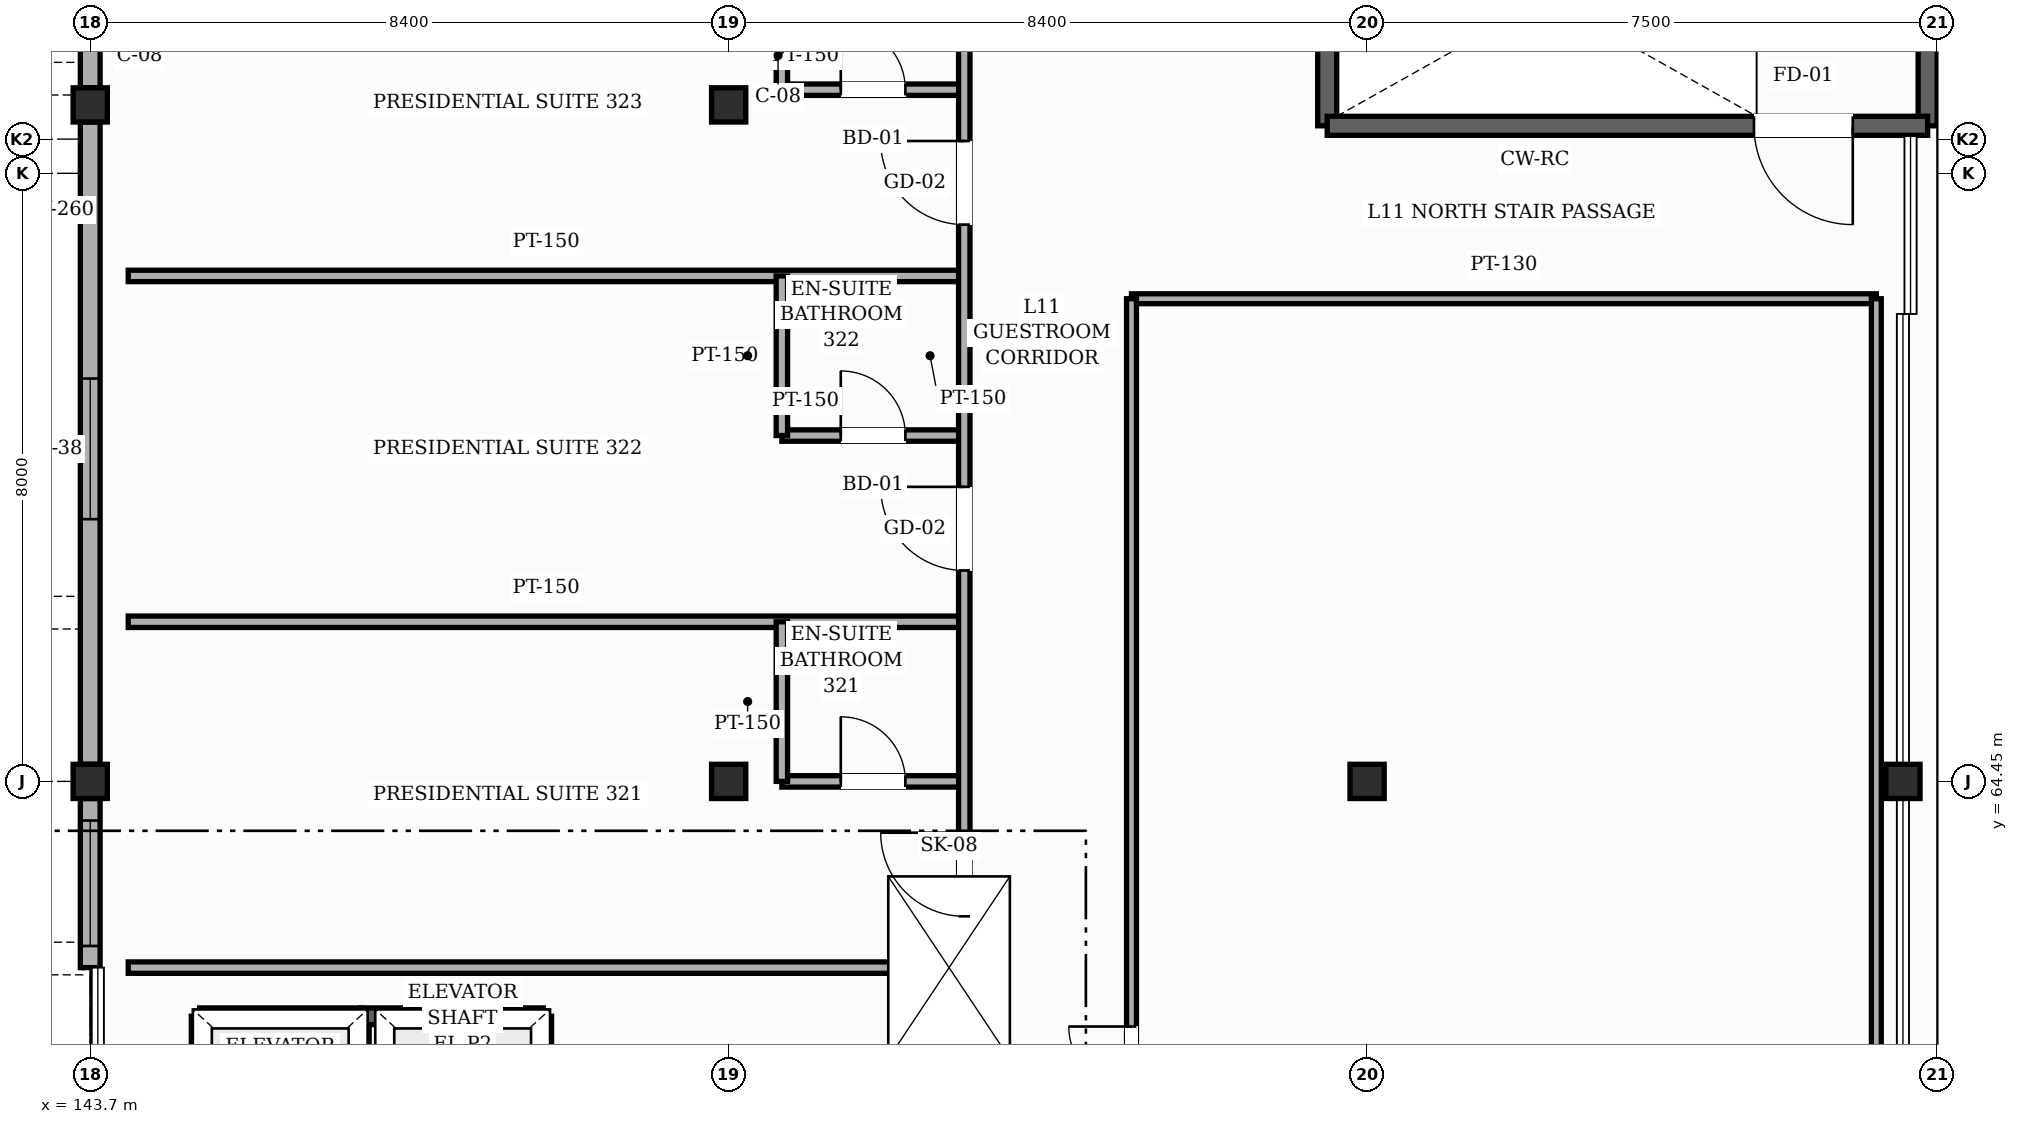
"""IFC4 building model, lengths in metres.
Left out: names, types, materials, properties, quantities, classifications, styles, units other than length and angle.
Written with IfcOpenShell. Run it as: python <this file> out.ifc"""

import sys

from ifc_helpers import new_model, si_unit, direction, frame, frame_2d, origin, origin_2d, place, context, subcontext, project, spatial, rectangle, hollow_rectangle, extrude, element, fill, save


model = new_model("IFC4")
c1 = context("Model", 3, precision=1e-05, world=origin(), true_north=direction((0.0, 1.0)))
c2 = subcontext(c1, "Body", "Model", "MODEL_VIEW")
j1 = project(units=[si_unit("LENGTHUNIT", "METRE"), si_unit("PLANEANGLEUNIT", "RADIAN")], contexts=[c1])
p1 = place(None, origin())
s1 = spatial("IfcSite", under=j1, at=p1, CompositionType="ELEMENT")
p2 = place(p1, origin())
s2 = spatial("IfcBuilding", under=s1, at=p2, CompositionType="ELEMENT")
p3 = place(p2, frame((0.0, 0.0, 46.2)))
s3 = spatial("IfcBuildingStorey", under=s2, at=p3, CompositionType="ELEMENT", Elevation=46.2)
for number, where, z_axis, x_axis in (
    (1, (143.7, 64.45, 0.0), (0.0, 0.0, 1.0), (1.0, 0.0, 0.0)),
    (2, (143.7, 73.35, 0.0), (0.0, 0.0, 1.0), (1.0, 0.0, 0.0)),
    (3, (152.1, 64.45, 0.0), (0.0, 0.0, 1.0), (1.0, 0.0, 0.0)),
    (4, (152.1, 73.35, 0.0), (0.0, 0.0, 1.0), (1.0, 0.0, 0.0)),
    (5, (160.5, 64.45, 0.0), (0.0, 0.0, 1.0), (1.0, 0.0, 0.0)),
    (6, (167.55, 64.45, 0.0), (0.0, 0.0, 1.0), (1.0, 0.0, 0.0)),
):
    element("IfcColumn", number, at=place(p3, frame(where, z_axis=z_axis, x_axis=x_axis)), inside=s3, PredefinedType="COLUMN", context=c2, shape_type="SweptSolid", body=[
        extrude(hollow_rectangle(XDim=0.45, YDim=0.45, WallThickness=0.019, InnerFilletRadius=0.019, OuterFilletRadius=0.038, at=origin_2d()), origin(), (0.0, 0.0, 1.0), 3.99),
    ])
p4 = place(p3, frame((143.7, 62.0, 0.0), z_axis=(0.0, 0.0, 1.0), x_axis=(0.0, 1.0, 0.0)))
e7 = element("IfcWall", 7, at=p4, inside=s3, PredefinedType="SOLIDWALL", context=c2, shape_type="SweptSolid", body=[
    extrude(rectangle(XDim=2.225, YDim=0.26, at=frame_2d((1.113, 0.0))), origin(), (0.0, 0.0, 1.0), 3.375),
])
p5 = place(p4, frame((0.285, 0.0, 0.85)))
e8 = element("IfcOpeningElement", 8, at=p5, cuts=e7, PredefinedType="OPENING", context=c2, shape_type="SweptSolid", body=[
    extrude(rectangle(XDim=1.65, YDim=1.65, at=frame_2d((0.825, 0.825))), frame((0.0, 0.14, 0.0), z_axis=(0.0, -1.0, 0.0), x_axis=(1.0, 0.0, 0.0)), (0.0, 0.0, 1.0), 0.28),
])
p6 = place(p3, frame((143.7, 64.675, 0.0), z_axis=(0.0, 0.0, 1.0), x_axis=(0.0, 1.0, 0.0)))
e9 = element("IfcWall", 9, at=p6, inside=s3, PredefinedType="SOLIDWALL", context=c2, shape_type="SweptSolid", body=[
    extrude(rectangle(XDim=8.45, YDim=0.26, at=frame_2d((4.225, 0.0))), origin(), (0.0, 0.0, 1.0), 3.225),
])
p7 = place(p6, frame((3.225, 0.0, 0.85)))
e10 = element("IfcOpeningElement", 10, at=p7, cuts=e9, PredefinedType="OPENING", context=c2, shape_type="SweptSolid", body=[
    extrude(rectangle(XDim=1.85, YDim=1.65, at=frame_2d((0.925, 0.825))), frame((0.0, 0.14, 0.0), z_axis=(0.0, -1.0, 0.0), x_axis=(1.0, 0.0, 0.0)), (0.0, 0.0, 1.0), 0.28),
])
p8 = place(p3, frame((143.7, 73.575, 0.0), z_axis=(0.0, 0.0, 1.0), x_axis=(0.0, 1.0, 0.0)))
e11 = element("IfcWall", 11, at=p8, inside=s3, PredefinedType="SOLIDWALL", context=c2, shape_type="SweptSolid", body=[
    extrude(rectangle(XDim=6.625, YDim=0.26, at=frame_2d((3.312, 0.0))), origin(), (0.0, 0.0, 1.0), 3.375),
])
p9 = place(p8, frame((0.615, 0.0, 0.85)))
e12 = element("IfcOpeningElement", 12, at=p9, cuts=e11, PredefinedType="OPENING", context=c2, shape_type="SweptSolid", body=[
    extrude(rectangle(XDim=0.85, YDim=1.35, at=frame_2d((0.425, 0.675))), frame((0.0, 0.14, 0.0), z_axis=(0.0, -1.0, 0.0), x_axis=(1.0, 0.0, 0.0)), (0.0, 0.0, 1.0), 0.28),
])
p10 = place(p8, frame((3.775, 0.0, 0.85)))
e13 = element("IfcOpeningElement", 13, at=p10, cuts=e11, PredefinedType="OPENING", context=c2, shape_type="SweptSolid", body=[
    extrude(rectangle(XDim=1.15, YDim=1.8, at=frame_2d((0.575, 0.9))), frame((0.0, 0.14, 0.0), z_axis=(0.0, -1.0, 0.0), x_axis=(1.0, 0.0, 0.0)), (0.0, 0.0, 1.0), 0.28),
])
for number, where, z_axis, x_axis in (
    (14, (167.875, 76.425, 0.0), (0.0, 0.0, 1.0), (0.0, -1.0, 0.0)),
    (15, (159.975, 73.075, 0.0), (0.0, 0.0, 1.0), (0.0, 1.0, 0.0)),
):
    element("IfcWall", number, at=place(p3, frame(where, z_axis=z_axis, x_axis=x_axis)), inside=s3, PredefinedType="SHEAR", context=c2, shape_type="SweptSolid", body=[
        extrude(rectangle(XDim=3.35, YDim=0.25, at=frame_2d((1.675, 0.0))), origin(), (0.0, 0.0, 1.0), 3.95),
    ])
p11 = place(p3, frame((167.875, 73.075, 0.0), z_axis=(0.0, 0.0, 1.0), x_axis=(-1.0, 0.0, 0.0)))
e16 = element("IfcWall", 16, at=p11, inside=s3, PredefinedType="SHEAR", context=c2, shape_type="SweptSolid", body=[
    extrude(rectangle(XDim=7.9, YDim=0.25, at=frame_2d((3.95, 0.0))), origin(), (0.0, 0.0, 1.0), 3.95),
])
p12 = place(p11, frame((0.985, 0.0, 0.0)))
e17 = element("IfcOpeningElement", 17, at=p12, cuts=e16, PredefinedType="OPENING", context=c2, shape_type="SweptSolid", body=[
    extrude(rectangle(XDim=1.3, YDim=2.2, at=frame_2d((0.65, 1.1))), frame((0.0, 0.135, 0.0), z_axis=(0.0, -1.0, 0.0), x_axis=(1.0, 0.0, 0.0)), (0.0, 0.0, 1.0), 0.27),
])
p13 = place(p3, frame((145.14, 61.36, 0.0), z_axis=(0.0, 0.0, 1.0), x_axis=(1.0, 0.0, 0.0)))
e18 = element("IfcWall", 18, at=p13, inside=s3, PredefinedType="SHEAR", context=c2, shape_type="SweptSolid", body=[
    extrude(rectangle(XDim=2.12, YDim=0.22, at=frame_2d((1.06, 0.0))), origin(), (0.0, 0.0, 1.0), 3.95),
])
for number, where, z_axis, x_axis in (
    (19, (147.26, 59.44, 0.0), (0.0, 0.0, 1.0), (0.0, 1.0, 0.0)),
    (20, (145.14, 59.44, 0.0), (0.0, 0.0, 1.0), (0.0, 1.0, 0.0)),
):
    element("IfcWall", number, at=place(p3, frame(where, z_axis=z_axis, x_axis=x_axis)), inside=s3, PredefinedType="SHEAR", context=c2, shape_type="SweptSolid", body=[
        extrude(rectangle(XDim=1.92, YDim=0.22, at=frame_2d((0.96, 0.0))), origin(), (0.0, 0.0, 1.0), 3.95),
    ])
p14 = place(p3, frame((147.26, 61.36, 0.0), z_axis=(0.0, 0.0, 1.0), x_axis=(1.0, 0.0, 0.0)))
e21 = element("IfcWall", 21, at=p14, inside=s3, PredefinedType="SHEAR", context=c2, shape_type="SweptSolid", body=[
    extrude(rectangle(XDim=2.4, YDim=0.22, at=frame_2d((1.2, 0.0))), origin(), (0.0, 0.0, 1.0), 3.95),
])
p15 = place(p3, frame((149.66, 59.44, 0.0), z_axis=(0.0, 0.0, 1.0), x_axis=(0.0, 1.0, 0.0)))
e22 = element("IfcWall", 22, at=p15, inside=s3, PredefinedType="SHEAR", context=c2, shape_type="SweptSolid", body=[
    extrude(rectangle(XDim=1.92, YDim=0.22, at=frame_2d((0.96, 0.0))), origin(), (0.0, 0.0, 1.0), 3.95),
])
p16 = place(p3, frame((144.2, 62.0, 0.0), z_axis=(0.0, 0.0, 1.0), x_axis=(1.0, 0.0, 0.0)))
e23 = element("IfcWall", 23, at=p16, inside=s3, PredefinedType="PARTITIONING", context=c2, shape_type="SweptSolid", body=[
    extrude(rectangle(XDim=11.0, YDim=0.15, at=frame_2d((5.5, 0.0))), origin(), (0.0, 0.0, 1.0), 3.935),
])
p17 = place(p3, frame((152.8, 64.45, 0.0), z_axis=(0.0, 0.0, 1.0), x_axis=(1.0, 0.0, 0.0)))
e24 = element("IfcWall", 24, at=p17, inside=s3, PredefinedType="PARTITIONING", context=c2, shape_type="SweptSolid", body=[
    extrude(rectangle(XDim=2.4, YDim=0.15, at=frame_2d((1.2, 0.0))), origin(), (0.0, 0.0, 1.0), 3.325),
])
p18 = place(p17, frame((0.775, 0.0, 0.0)))
e25 = element("IfcOpeningElement", 25, at=p18, cuts=e24, PredefinedType="OPENING", context=c2, shape_type="SweptSolid", body=[
    extrude(rectangle(XDim=0.85, YDim=2.1, at=frame_2d((0.425, 1.05))), frame((0.0, 0.085, 0.0), z_axis=(0.0, -1.0, 0.0), x_axis=(1.0, 0.0, 0.0)), (0.0, 0.0, 1.0), 0.17),
])
p19 = place(p3, frame((144.2, 66.55, 0.0), z_axis=(0.0, 0.0, 1.0), x_axis=(1.0, 0.0, 0.0)))
e26 = element("IfcWall", 26, at=p19, inside=s3, PredefinedType="PARTITIONING", context=c2, shape_type="SweptSolid", body=[
    extrude(rectangle(XDim=11.0, YDim=0.15, at=frame_2d((5.5, 0.0))), origin(), (0.0, 0.0, 1.0), 3.935),
])
p20 = place(p3, frame((152.8, 69.0, 0.0), z_axis=(0.0, 0.0, 1.0), x_axis=(1.0, 0.0, 0.0)))
e27 = element("IfcWall", 27, at=p20, inside=s3, PredefinedType="PARTITIONING", context=c2, shape_type="SweptSolid", body=[
    extrude(rectangle(XDim=2.4, YDim=0.15, at=frame_2d((1.2, 0.0))), origin(), (0.0, 0.0, 1.0), 3.935),
])
p21 = place(p20, frame((0.775, 0.0, 0.0)))
e28 = element("IfcOpeningElement", 28, at=p21, cuts=e27, PredefinedType="OPENING", context=c2, shape_type="SweptSolid", body=[
    extrude(rectangle(XDim=0.85, YDim=2.1, at=frame_2d((0.425, 1.05))), frame((0.0, 0.085, 0.0), z_axis=(0.0, -1.0, 0.0), x_axis=(1.0, 0.0, 0.0)), (0.0, 0.0, 1.0), 0.17),
])
p22 = place(p3, frame((157.4, 70.8, 0.0), z_axis=(0.0, 0.0, 1.0), x_axis=(1.0, 0.0, 0.0)))
e29 = element("IfcWall", 29, at=p22, inside=s3, PredefinedType="PARTITIONING", context=c2, shape_type="SweptSolid", body=[
    extrude(rectangle(XDim=9.8, YDim=0.13, at=frame_2d((4.9, 0.0))), origin(), (0.0, 0.0, 1.0), 3.935),
])
p23 = place(p3, frame((144.2, 71.1, 0.0), z_axis=(0.0, 0.0, 1.0), x_axis=(1.0, 0.0, 0.0)))
e30 = element("IfcWall", 30, at=p23, inside=s3, PredefinedType="PARTITIONING", context=c2, shape_type="SweptSolid", body=[
    extrude(rectangle(XDim=11.0, YDim=0.15, at=frame_2d((5.5, 0.0))), origin(), (0.0, 0.0, 1.0), 3.935),
])
p24 = place(p3, frame((152.8, 73.55, 0.0), z_axis=(0.0, 0.0, 1.0), x_axis=(1.0, 0.0, 0.0)))
e31 = element("IfcWall", 31, at=p24, inside=s3, PredefinedType="PARTITIONING", context=c2, shape_type="SweptSolid", body=[
    extrude(rectangle(XDim=2.4, YDim=0.15, at=frame_2d((1.2, 0.0))), origin(), (0.0, 0.0, 1.0), 3.935),
])
p25 = place(p24, frame((0.775, 0.0, 0.0)))
e32 = element("IfcOpeningElement", 32, at=p25, cuts=e31, PredefinedType="OPENING", context=c2, shape_type="SweptSolid", body=[
    extrude(rectangle(XDim=0.85, YDim=2.1, at=frame_2d((0.425, 1.05))), frame((0.0, 0.085, 0.0), z_axis=(0.0, -1.0, 0.0), x_axis=(1.0, 0.0, 0.0)), (0.0, 0.0, 1.0), 0.17),
])
for number, where, z_axis, x_axis in (
    (33, (152.8, 64.45, 0.0), (0.0, 0.0, 1.0), (0.0, 1.0, 0.0)),
    (34, (152.8, 69.0, 0.0), (0.0, 0.0, 1.0), (0.0, 1.0, 0.0)),
):
    element("IfcWall", number, at=place(p3, frame(where, z_axis=z_axis, x_axis=x_axis)), inside=s3, PredefinedType="PARTITIONING", context=c2, shape_type="SweptSolid", body=[
        extrude(rectangle(XDim=2.1, YDim=0.15, at=frame_2d((1.05, 0.0))), origin(), (0.0, 0.0, 1.0), 3.935),
    ])
p26 = place(p3, frame((152.8, 73.55, 0.0), z_axis=(0.0, 0.0, 1.0), x_axis=(0.0, 1.0, 0.0)))
e35 = element("IfcWall", 35, at=p26, inside=s3, PredefinedType="PARTITIONING", context=c2, shape_type="SweptSolid", body=[
    extrude(rectangle(XDim=2.1, YDim=0.15, at=frame_2d((1.05, 0.0))), origin(), (0.0, 0.0, 1.0), 3.935),
])
p27 = place(p3, frame((155.2, 62.0, 0.0), z_axis=(0.0, 0.0, 1.0), x_axis=(0.0, 1.0, 0.0)))
e36 = element("IfcWall", 36, at=p27, inside=s3, PredefinedType="PARTITIONING", context=c2, shape_type="SweptSolid", body=[
    extrude(rectangle(XDim=18.2, YDim=0.15, at=frame_2d((9.1, 0.0))), origin(), (0.0, 0.0, 1.0), 3.935),
])
p28 = place(p27, frame((0.675, 0.0, 0.0)))
e37 = element("IfcOpeningElement", 37, at=p28, cuts=e36, PredefinedType="OPENING", context=c2, shape_type="SweptSolid", body=[
    extrude(rectangle(XDim=1.1, YDim=2.2, at=frame_2d((0.55, 1.1))), frame((0.0, 0.085, 0.0), z_axis=(0.0, -1.0, 0.0), x_axis=(1.0, 0.0, 0.0)), (0.0, 0.0, 1.0), 0.17),
])
p29 = place(p27, frame((5.225, 0.0, 0.0)))
e38 = element("IfcOpeningElement", 38, at=p29, cuts=e36, PredefinedType="OPENING", context=c2, shape_type="SweptSolid", body=[
    extrude(rectangle(XDim=1.1, YDim=2.2, at=frame_2d((0.55, 1.1))), frame((0.0, 0.085, 0.0), z_axis=(0.0, -1.0, 0.0), x_axis=(1.0, 0.0, 0.0)), (0.0, 0.0, 1.0), 0.17),
])
p30 = place(p27, frame((9.775, 0.0, 0.0)))
e39 = element("IfcOpeningElement", 39, at=p30, cuts=e36, PredefinedType="OPENING", context=c2, shape_type="SweptSolid", body=[
    extrude(rectangle(XDim=1.1, YDim=2.2, at=frame_2d((0.55, 1.1))), frame((0.0, 0.085, 0.0), z_axis=(0.0, -1.0, 0.0), x_axis=(1.0, 0.0, 0.0)), (0.0, 0.0, 1.0), 0.17),
])
p31 = place(p27, frame((14.325, 0.0, 0.0)))
e40 = element("IfcOpeningElement", 40, at=p31, cuts=e36, PredefinedType="OPENING", context=c2, shape_type="SweptSolid", body=[
    extrude(rectangle(XDim=1.1, YDim=2.2, at=frame_2d((0.55, 1.1))), frame((0.0, 0.085, 0.0), z_axis=(0.0, -1.0, 0.0), x_axis=(1.0, 0.0, 0.0)), (0.0, 0.0, 1.0), 0.17),
])
p32 = place(p3, frame((157.4, 22.6, 0.0), z_axis=(0.0, 0.0, 1.0), x_axis=(0.0, 1.0, 0.0)))
e41 = element("IfcWall", 41, at=p32, inside=s3, PredefinedType="PARTITIONING", context=c2, shape_type="SweptSolid", body=[
    extrude(rectangle(XDim=48.2, YDim=0.13, at=frame_2d((24.1, 0.0))), origin(), (0.0, 0.0, 1.0), 3.935),
])
p33 = place(p32, frame((12.675, 0.0, 0.0)))
e42 = element("IfcOpeningElement", 42, at=p33, cuts=e41, PredefinedType="OPENING", context=c2, shape_type="SweptSolid", body=[
    extrude(rectangle(XDim=2.05, YDim=2.45, at=frame_2d((1.025, 1.225))), frame((0.0, 0.075, 0.0), z_axis=(0.0, -1.0, 0.0), x_axis=(1.0, 0.0, 0.0)), (0.0, 0.0, 1.0), 0.15),
])
p34 = place(p32, frame((36.975, 0.0, 0.0)))
e43 = element("IfcOpeningElement", 43, at=p34, cuts=e41, PredefinedType="OPENING", context=c2, shape_type="SweptSolid", body=[
    extrude(rectangle(XDim=1.65, YDim=2.35, at=frame_2d((0.825, 1.175))), frame((0.0, 0.075, 0.0), z_axis=(0.0, -1.0, 0.0), x_axis=(1.0, 0.0, 0.0)), (0.0, 0.0, 1.0), 0.15),
])
p35 = place(p3, frame((167.2, 50.0, 0.0), z_axis=(0.0, 0.0, 1.0), x_axis=(0.0, 1.0, 0.0)))
e44 = element("IfcWall", 44, at=p35, inside=s3, PredefinedType="PARTITIONING", context=c2, shape_type="SweptSolid", body=[
    extrude(rectangle(XDim=20.8, YDim=0.13, at=frame_2d((10.4, 0.0))), origin(), (0.0, 0.0, 1.0), 3.935),
])
p36 = place(p5, origin())
e45 = element("IfcWindow", 45, at=p36, inside=s3, PartitioningType="SINGLE_PANEL", PredefinedType="WINDOW", context=c2, shape_type="SweptSolid", body=[
    extrude(rectangle(XDim=1.65, YDim=1.65, at=frame_2d((0.825, 0.825))), frame((0.0, 0.03, 0.0), z_axis=(0.0, -1.0, 0.0), x_axis=(1.0, 0.0, 0.0)), (0.0, 0.0, 1.0), 0.06),
])
fill(e8, e45)
p37 = place(p7, origin())
e46 = element("IfcWindow", 46, at=p37, inside=s3, PartitioningType="SINGLE_PANEL", PredefinedType="WINDOW", context=c2, shape_type="SweptSolid", body=[
    extrude(rectangle(XDim=1.85, YDim=1.65, at=frame_2d((0.925, 0.825))), frame((0.0, 0.03, 0.0), z_axis=(0.0, -1.0, 0.0), x_axis=(1.0, 0.0, 0.0)), (0.0, 0.0, 1.0), 0.06),
])
fill(e10, e46)
p38 = place(p2, frame((0.0, 0.0, 50.4)))
p39 = place(p38, frame((0.0, 0.0, -0.21)))
p40 = place(p39, frame((155.0, 62.0, 0.0)))
p41 = place(p40, frame((0.0, 0.0, 0.16)))
e47 = element("IfcWindow", 47, at=p41, inside=s3, PartitioningType="SINGLE_PANEL", PredefinedType="SKYLIGHT", context=c2, shape_type="SweptSolid", body=[
    extrude(rectangle(XDim=1.6, YDim=2.4, at=origin_2d()), origin(), (0.0, 0.0, 1.0), 0.05),
])
p42 = place(p12, origin())
e48 = element("IfcDoor", 48, at=p42, inside=s3, OperationType="SINGLE_SWING_LEFT", PredefinedType="DOOR", context=c2, shape_type="SweptSolid", body=[
    extrude(rectangle(XDim=1.3, YDim=2.2, at=frame_2d((0.65, 1.1))), frame((0.0, 0.025, 0.0), z_axis=(0.0, -1.0, 0.0), x_axis=(1.0, 0.0, 0.0)), (0.0, 0.0, 1.0), 0.05),
])
fill(e17, e48)
p43 = place(p34, origin())
e49 = element("IfcDoor", 49, at=p43, inside=s3, OperationType="DOUBLE_DOOR_SINGLE_SWING", PredefinedType="DOOR", context=c2, shape_type="SweptSolid", body=[
    extrude(rectangle(XDim=1.65, YDim=2.35, at=frame_2d((0.825, 1.175))), frame((0.0, 0.025, 0.0), z_axis=(0.0, -1.0, 0.0), x_axis=(1.0, 0.0, 0.0)), (0.0, 0.0, 1.0), 0.05),
])
fill(e43, e49)
p44 = place(p28, origin())
e50 = element("IfcDoor", 50, at=p44, inside=s3, OperationType="SINGLE_SWING_RIGHT", PredefinedType="DOOR", context=c2, shape_type="SweptSolid", body=[
    extrude(rectangle(XDim=1.1, YDim=2.2, at=frame_2d((0.55, 1.1))), frame((0.0, 0.025, 0.0), z_axis=(0.0, -1.0, 0.0), x_axis=(1.0, 0.0, 0.0)), (0.0, 0.0, 1.0), 0.05),
])
fill(e37, e50)
p45 = place(p18, origin())
e51 = element("IfcDoor", 51, at=p45, inside=s3, OperationType="SINGLE_SWING_LEFT", PredefinedType="DOOR", context=c2, shape_type="SweptSolid", body=[
    extrude(rectangle(XDim=0.85, YDim=2.1, at=frame_2d((0.425, 1.05))), frame((0.0, 0.025, 0.0), z_axis=(0.0, -1.0, 0.0), x_axis=(1.0, 0.0, 0.0)), (0.0, 0.0, 1.0), 0.05),
])
fill(e25, e51)
p46 = place(p29, origin())
e52 = element("IfcDoor", 52, at=p46, inside=s3, OperationType="SINGLE_SWING_RIGHT", PredefinedType="DOOR", context=c2, shape_type="SweptSolid", body=[
    extrude(rectangle(XDim=1.1, YDim=2.2, at=frame_2d((0.55, 1.1))), frame((0.0, 0.025, 0.0), z_axis=(0.0, -1.0, 0.0), x_axis=(1.0, 0.0, 0.0)), (0.0, 0.0, 1.0), 0.05),
])
fill(e38, e52)
p47 = place(p21, origin())
e53 = element("IfcDoor", 53, at=p47, inside=s3, OperationType="SINGLE_SWING_LEFT", PredefinedType="DOOR", context=c2, shape_type="SweptSolid", body=[
    extrude(rectangle(XDim=0.85, YDim=2.1, at=frame_2d((0.425, 1.05))), frame((0.0, 0.025, 0.0), z_axis=(0.0, -1.0, 0.0), x_axis=(1.0, 0.0, 0.0)), (0.0, 0.0, 1.0), 0.05),
])
fill(e28, e53)
p48 = place(p30, origin())
e54 = element("IfcDoor", 54, at=p48, inside=s3, OperationType="SINGLE_SWING_RIGHT", PredefinedType="DOOR", context=c2, shape_type="SweptSolid", body=[
    extrude(rectangle(XDim=1.1, YDim=2.2, at=frame_2d((0.55, 1.1))), frame((0.0, 0.025, 0.0), z_axis=(0.0, -1.0, 0.0), x_axis=(1.0, 0.0, 0.0)), (0.0, 0.0, 1.0), 0.05),
])
fill(e39, e54)
p49 = place(p25, origin())
e55 = element("IfcDoor", 55, at=p49, inside=s3, OperationType="SINGLE_SWING_LEFT", PredefinedType="DOOR", context=c2, shape_type="SweptSolid", body=[
    extrude(rectangle(XDim=0.85, YDim=2.1, at=frame_2d((0.425, 1.05))), frame((0.0, 0.025, 0.0), z_axis=(0.0, -1.0, 0.0), x_axis=(1.0, 0.0, 0.0)), (0.0, 0.0, 1.0), 0.05),
])
fill(e32, e55)
save(model, sys.argv[1])
